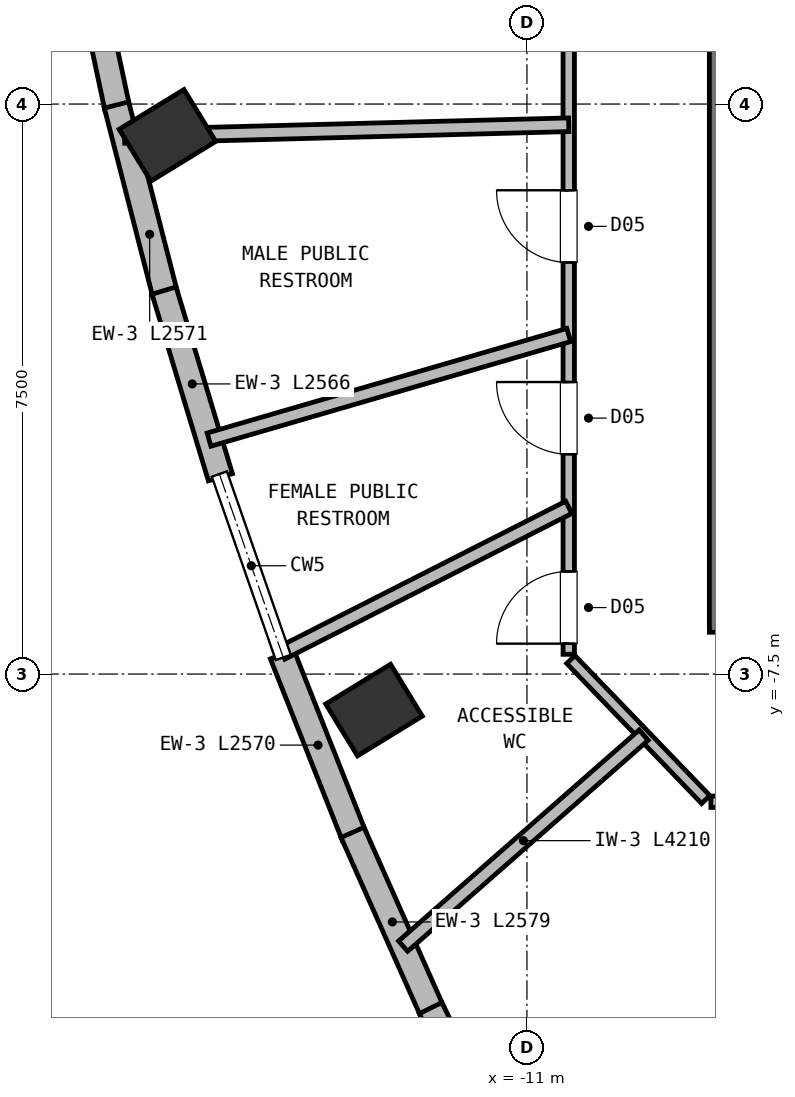
"""IFC4 building model, lengths in metres.
Left out: names, types, materials, properties, quantities, classifications, styles, units other than length and angle.
Written with IfcOpenShell. Run it as: python <this file> out.ifc"""

import sys

from ifc_helpers import new_model, si_unit, direction, frame, frame_2d, origin, origin_2d, place, context, subcontext, project, spatial, rectangle, extrude, element, fill, save


model = new_model("IFC4")
c1 = context("Model", 3, precision=1e-05, world=origin(), true_north=direction((0.0, 1.0)))
c2 = subcontext(c1, "Body", "Model", "MODEL_VIEW")
j1 = project(units=[si_unit("LENGTHUNIT", "METRE"), si_unit("PLANEANGLEUNIT", "RADIAN")], contexts=[c1])
p1 = place(None, origin())
s1 = spatial("IfcSite", under=j1, at=p1, CompositionType="ELEMENT")
p2 = place(p1, origin())
s2 = spatial("IfcBuilding", under=s1, at=p2, CompositionType="ELEMENT")
p3 = place(p2, frame((0.0, 0.0, 173.75)))
s3 = spatial("IfcBuildingStorey", under=s2, at=p3, CompositionType="ELEMENT", Elevation=173.75)
p4 = place(p3, frame((-8.35, -6.95, 0.0), z_axis=(0.0, 0.0, 1.0), x_axis=(0.0, 1.0, 0.0)))
e1 = element("IfcWall", 1, at=p4, inside=s3, PredefinedType="SHEAR", context=c2, shape_type="SweptSolid", body=[
    extrude(rectangle(XDim=8.1, YDim=0.5, at=frame_2d((4.05, 0.0))), origin(), (0.0, 0.0, 1.0), 4.21),
])
for number, where, z_axis, x_axis in (
    (2, (-15.73, -0.412, 0.0), (0.0, 0.0, 1.0), (-0.522, 0.853, 0.0)),
    (3, (-13.012, -7.974, 0.0), (0.0, 0.0, 1.0), (-0.522, 0.853, 0.0)),
):
    element("IfcColumn", number, at=place(p3, frame(where, z_axis=z_axis, x_axis=x_axis)), inside=s3, PredefinedType="COLUMN", context=c2, shape_type="SweptSolid", body=[
        extrude(rectangle(XDim=0.8, YDim=1.0, at=origin_2d()), origin(), (0.0, 0.0, 1.0), 4.5),
    ])
p5 = place(p3, frame((-16.389, -0.061, 0.0), z_axis=(0.0, 0.0, 1.0), x_axis=(-0.208022879961, 0.978123960146, 0.0)))
e4 = element("IfcWall", 4, at=p5, inside=s3, PredefinedType="SOLIDWALL", context=c2, shape_type="SweptSolid", body=[
    extrude(rectangle(XDim=2.58, YDim=0.33, at=frame_2d((1.29, 0.0))), origin(), (0.0, 0.0, 1.0), 4.21),
])
p6 = place(p3, frame((-15.761, -2.502, 0.0), z_axis=(0.0, 0.0, 1.0), x_axis=(-0.248743226802, 0.968569464272, 0.0)))
e5 = element("IfcWall", 5, at=p6, inside=s3, PredefinedType="SOLIDWALL", context=c2, shape_type="SweptSolid", body=[
    extrude(rectangle(XDim=2.571, YDim=0.33, at=frame_2d((1.285, 0.0))), origin(), (0.0, 0.0, 1.0), 4.21),
])
p7 = place(p3, frame((-15.033, -4.911, 0.0), z_axis=(0.0, 0.0, 1.0), x_axis=(-0.288953589152, 0.957343106371, 0.0)))
e6 = element("IfcWall", 6, at=p7, inside=s3, PredefinedType="SOLIDWALL", context=c2, shape_type="SweptSolid", body=[
    extrude(rectangle(XDim=2.566, YDim=0.33, at=frame_2d((1.283, 0.0))), origin(), (0.0, 0.0, 1.0), 4.21),
])
p8 = place(p3, frame((-13.275, -9.63, 0.0), z_axis=(0.0, 0.0, 1.0), x_axis=(-0.368145960329, 0.929768009717, 0.0)))
e7 = element("IfcWall", 7, at=p8, inside=s3, PredefinedType="SOLIDWALL", context=c2, shape_type="SweptSolid", body=[
    extrude(rectangle(XDim=2.57, YDim=0.33, at=frame_2d((1.285, 0.0))), origin(), (0.0, 0.0, 1.0), 4.21),
])
p9 = place(p3, frame((-12.246, -11.94, 0.0), z_axis=(0.0, 0.0, 1.0), x_axis=(-0.406630213632, 0.913592835656, 0.0)))
e8 = element("IfcWall", 8, at=p9, inside=s3, PredefinedType="SOLIDWALL", context=c2, shape_type="SweptSolid", body=[
    extrude(rectangle(XDim=2.579, YDim=0.33, at=frame_2d((1.29, 0.0))), origin(), (0.0, 0.0, 1.0), 4.21),
])
p10 = place(p3, frame((-11.116, -14.218, 0.0), z_axis=(0.0, 0.0, 1.0), x_axis=(-0.44393335953, 0.896059803973, 0.0)))
e9 = element("IfcWall", 9, at=p10, inside=s3, PredefinedType="SOLIDWALL", context=c2, shape_type="SweptSolid", body=[
    extrude(rectangle(XDim=2.593, YDim=0.33, at=frame_2d((1.296, 0.0))), origin(), (0.0, 0.0, 1.0), 4.21),
])
p11 = place(p10, frame((0.296, 0.0, 0.72)))
e10 = element("IfcOpeningElement", 10, at=p11, cuts=e9, PredefinedType="OPENING", context=c2, shape_type="SweptSolid", body=[
    extrude(rectangle(XDim=2.0, YDim=2.15, at=frame_2d((1.0, 1.075))), frame((0.0, 0.175, 0.0), z_axis=(0.0, -1.0, 0.0), x_axis=(1.0, 0.0, 0.0)), (0.0, 0.0, 1.0), 0.35),
])
p12 = place(p3, frame((8.58, -9.18, 0.0), z_axis=(0.0, 0.0, 1.0), x_axis=(-1.0, 0.0, 0.0)))
e11 = element("IfcWall", 11, at=p12, inside=s3, PredefinedType="PARTITIONING", context=c2, shape_type="SweptSolid", body=[
    extrude(rectangle(XDim=17.16, YDim=0.15, at=frame_2d((8.58, 0.0))), origin(), (0.0, 0.0, 1.0), 3.89),
])
p13 = place(p12, frame((2.507, 0.0, 0.0)))
e12 = element("IfcOpeningElement", 12, at=p13, cuts=e11, PredefinedType="OPENING", context=c2, shape_type="SweptSolid", body=[
    extrude(rectangle(XDim=1.0, YDim=2.15, at=frame_2d((0.5, 1.075))), frame((0.0, 0.085, 0.0), z_axis=(0.0, -1.0, 0.0), x_axis=(1.0, 0.0, 0.0)), (0.0, 0.0, 1.0), 0.17),
])
p14 = place(p12, frame((10.894, 0.0, 0.0)))
e13 = element("IfcOpeningElement", 13, at=p14, cuts=e11, PredefinedType="OPENING", context=c2, shape_type="SweptSolid", body=[
    extrude(rectangle(XDim=1.0, YDim=2.15, at=frame_2d((0.5, 1.075))), frame((0.0, 0.085, 0.0), z_axis=(0.0, -1.0, 0.0), x_axis=(1.0, 0.0, 0.0)), (0.0, 0.0, 1.0), 0.17),
])
p15 = place(p3, frame((-10.45, -7.24, 0.0), z_axis=(0.0, 0.0, 1.0), x_axis=(0.0, 1.0, 0.0)))
e14 = element("IfcWall", 14, at=p15, inside=s3, PredefinedType="PARTITIONING", context=c2, shape_type="SweptSolid", body=[
    extrude(rectangle(XDim=14.48, YDim=0.15, at=frame_2d((7.24, 0.0))), origin(), (0.0, 0.0, 1.0), 3.89),
])
p16 = place(p15, frame((2.632, 0.0, 0.0)))
e15 = element("IfcOpeningElement", 15, at=p16, cuts=e14, PredefinedType="OPENING", context=c2, shape_type="SweptSolid", body=[
    extrude(rectangle(XDim=0.95, YDim=2.1, at=frame_2d((0.475, 1.05))), frame((0.0, 0.085, 0.0), z_axis=(0.0, -1.0, 0.0), x_axis=(1.0, 0.0, 0.0)), (0.0, 0.0, 1.0), 0.17),
])
p17 = place(p15, frame((0.14, 0.0, 0.0)))
e16 = element("IfcOpeningElement", 16, at=p17, cuts=e14, PredefinedType="OPENING", context=c2, shape_type="SweptSolid", body=[
    extrude(rectangle(XDim=0.95, YDim=2.1, at=frame_2d((0.475, 1.05))), frame((0.0, 0.085, 0.0), z_axis=(0.0, -1.0, 0.0), x_axis=(1.0, 0.0, 0.0)), (0.0, 0.0, 1.0), 0.17),
])
p18 = place(p15, frame((5.156, 0.0, 0.0)))
e17 = element("IfcOpeningElement", 17, at=p18, cuts=e14, PredefinedType="OPENING", context=c2, shape_type="SweptSolid", body=[
    extrude(rectangle(XDim=0.95, YDim=2.1, at=frame_2d((0.475, 1.05))), frame((0.0, 0.085, 0.0), z_axis=(0.0, -1.0, 0.0), x_axis=(1.0, 0.0, 0.0)), (0.0, 0.0, 1.0), 0.17),
])
p19 = place(p15, frame((10.174, 0.0, 0.0)))
e18 = element("IfcOpeningElement", 18, at=p19, cuts=e14, PredefinedType="OPENING", context=c2, shape_type="SweptSolid", body=[
    extrude(rectangle(XDim=1.0, YDim=2.15, at=frame_2d((0.5, 1.075))), frame((0.0, 0.085, 0.0), z_axis=(0.0, -1.0, 0.0), x_axis=(1.0, 0.0, 0.0)), (0.0, 0.0, 1.0), 0.17),
])
p20 = place(p3, frame((-8.648, -9.151, 0.0), z_axis=(0.0, 0.0, 1.0), x_axis=(-0.693764562202, 0.720201869085, 0.0)))
e19 = element("IfcWall", 19, at=p20, inside=s3, PredefinedType="PARTITIONING", context=c2, shape_type="SweptSolid", body=[
    extrude(rectangle(XDim=2.558, YDim=0.15, at=frame_2d((1.279, 0.0))), origin(), (0.0, 0.0, 1.0), 3.89),
])
p21 = place(p3, frame((-9.464, -8.304, 0.0), z_axis=(0.0, 0.0, 1.0), x_axis=(-0.751703129052, -0.659501634398, 0.0)))
e20 = element("IfcWall", 20, at=p21, inside=s3, PredefinedType="PARTITIONING", context=c2, shape_type="SweptSolid", body=[
    extrude(rectangle(XDim=4.21, YDim=0.18, at=frame_2d((2.105, 0.0))), origin(), (0.0, 0.0, 1.0), 4.21),
])
p22 = place(p3, frame((-10.45, -0.273, 0.0), z_axis=(0.0, 0.0, 1.0), x_axis=(-0.999660448282, -0.026057400883, 0.0)))
e21 = element("IfcWall", 21, at=p22, inside=s3, PredefinedType="PARTITIONING", context=c2, shape_type="SweptSolid", body=[
    extrude(rectangle(XDim=5.846, YDim=0.18, at=frame_2d((2.923, 0.0))), origin(), (0.0, 0.0, 1.0), 3.74),
])
p23 = place(p3, frame((-10.45, -3.039, 0.0), z_axis=(0.0, 0.0, 1.0), x_axis=(-0.960221623397, -0.279239026573, 0.0)))
e22 = element("IfcWall", 22, at=p23, inside=s3, PredefinedType="PARTITIONING", context=c2, shape_type="SweptSolid", body=[
    extrude(rectangle(XDim=4.928, YDim=0.18, at=frame_2d((2.464, 0.0))), origin(), (0.0, 0.0, 1.0), 4.21),
])
p24 = place(p3, frame((-10.45, -5.307, 0.0), z_axis=(0.0, 0.0, 1.0), x_axis=(-0.891631325456, -0.452762166557, 0.0)))
e23 = element("IfcWall", 23, at=p24, inside=s3, PredefinedType="PARTITIONING", context=c2, shape_type="SweptSolid", body=[
    extrude(rectangle(XDim=4.235, YDim=0.18, at=frame_2d((2.118, 0.0))), origin(), (0.0, 0.0, 1.0), 4.21),
])
p25 = place(p16, origin())
e24 = element("IfcDoor", 24, at=p25, inside=s3, OperationType="SINGLE_SWING_RIGHT", PredefinedType="DOOR", context=c2, shape_type="SweptSolid", body=[
    extrude(rectangle(XDim=0.95, YDim=2.1, at=frame_2d((0.475, 1.05))), frame((0.0, 0.025, 0.0), z_axis=(0.0, -1.0, 0.0), x_axis=(1.0, 0.0, 0.0)), (0.0, 0.0, 1.0), 0.05),
])
fill(e15, e24)
p26 = place(p17, origin())
e25 = element("IfcDoor", 25, at=p26, inside=s3, OperationType="SINGLE_SWING_LEFT", PredefinedType="DOOR", context=c2, shape_type="SweptSolid", body=[
    extrude(rectangle(XDim=0.95, YDim=2.1, at=frame_2d((0.475, 1.05))), frame((0.0, 0.025, 0.0), z_axis=(0.0, -1.0, 0.0), x_axis=(1.0, 0.0, 0.0)), (0.0, 0.0, 1.0), 0.05),
])
fill(e16, e25)
p27 = place(p18, origin())
e26 = element("IfcDoor", 26, at=p27, inside=s3, OperationType="SINGLE_SWING_RIGHT", PredefinedType="DOOR", context=c2, shape_type="SweptSolid", body=[
    extrude(rectangle(XDim=0.95, YDim=2.1, at=frame_2d((0.475, 1.05))), frame((0.0, 0.025, 0.0), z_axis=(0.0, -1.0, 0.0), x_axis=(1.0, 0.0, 0.0)), (0.0, 0.0, 1.0), 0.05),
])
fill(e17, e26)
save(model, sys.argv[1])
